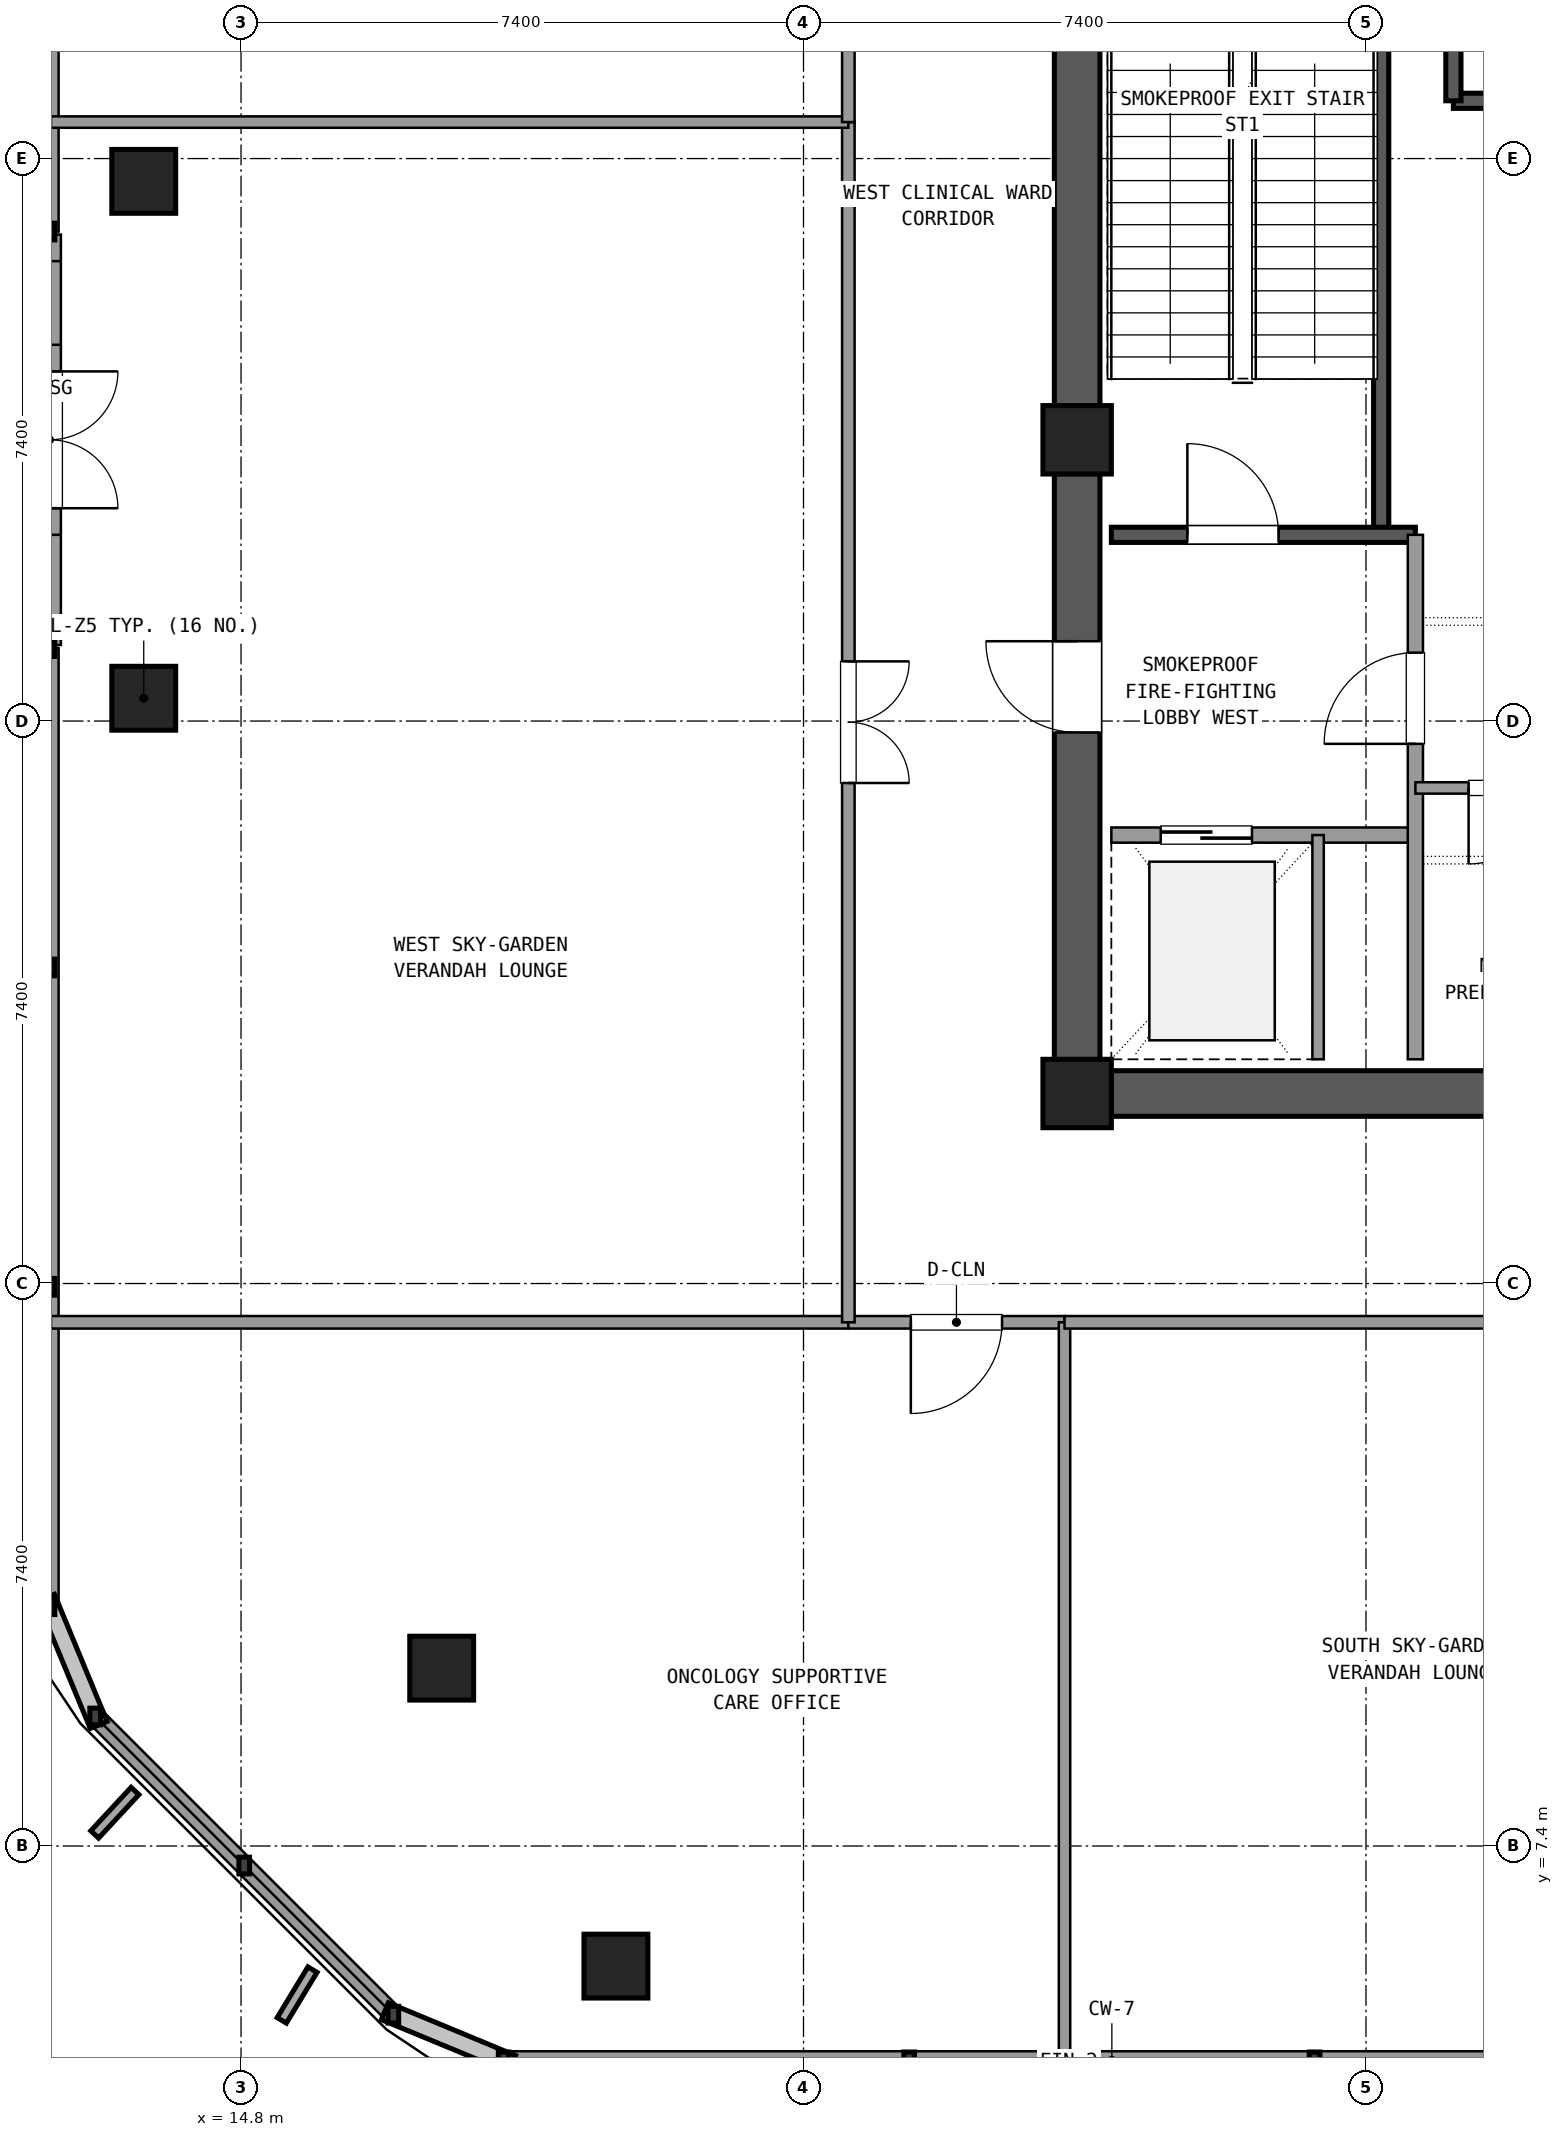
"""IFC4 building model, lengths in metres.
Left out: names, types, materials, properties, quantities, classifications, styles, units other than length and angle.
Written with IfcOpenShell. Run it as: python <this file> out.ifc"""

import sys

from ifc_helpers import new_model, si_unit, direction, frame, frame_2d, origin, origin_2d, place, context, subcontext, project, spatial, rectangle, extrude, element, fill, save


model = new_model("IFC4")
c1 = context("Model", 3, precision=1e-05, world=origin(), true_north=direction((0.0, 1.0)))
c2 = subcontext(c1, "Body", "Model", "MODEL_VIEW")
j1 = project(units=[si_unit("LENGTHUNIT", "METRE"), si_unit("PLANEANGLEUNIT", "RADIAN")], contexts=[c1])
p1 = place(None, origin())
s1 = spatial("IfcSite", under=j1, at=p1, CompositionType="ELEMENT")
p2 = place(p1, origin())
s2 = spatial("IfcBuilding", under=s1, at=p2, CompositionType="ELEMENT")
p3 = place(p2, frame((0.0, 0.0, 237.06)))
s3 = spatial("IfcBuildingStorey", under=s2, at=p3, CompositionType="ELEMENT", Elevation=237.06)
for number, where, z_axis, x_axis in (
    (1, (25.8, 17.3, 0.0), (0.0, 0.0, 1.0), (1.0, 0.0, 0.0)),
    (2, (25.8, 25.9, 0.0), (0.0, 0.0, 1.0), (1.0, 0.0, 0.0)),
):
    element("IfcColumn", number, at=place(p3, frame(where, z_axis=z_axis, x_axis=x_axis)), inside=s3, PredefinedType="COLUMN", context=c2, shape_type="SweptSolid", body=[
        extrude(rectangle(XDim=0.9, YDim=0.9, at=origin_2d()), origin(), (0.0, 0.0, 1.0), 5.76),
    ])
p4 = place(p3, frame((26.245, 17.3, 0.0), z_axis=(0.0, 0.0, 1.0), x_axis=(1.0, 0.0, 0.0)))
e3 = element("IfcWall", 3, at=p4, inside=s3, PredefinedType="SHEAR", context=c2, shape_type="SweptSolid", body=[
    extrude(rectangle(XDim=10.31, YDim=0.6, at=frame_2d((5.155, 0.0))), origin(), (0.0, 0.0, 1.0), 5.48),
])
p5 = place(p3, frame((25.8, 34.055, 0.0), z_axis=(0.0, 0.0, 1.0), x_axis=(0.0, -1.0, 0.0)))
e4 = element("IfcWall", 4, at=p5, inside=s3, PredefinedType="SHEAR", context=c2, shape_type="SweptSolid", body=[
    extrude(rectangle(XDim=7.71, YDim=0.6, at=frame_2d((3.855, 0.0))), origin(), (0.0, 0.0, 1.0), 5.48),
])
p6 = place(p3, frame((25.8, 25.455, 0.0), z_axis=(0.0, 0.0, 1.0), x_axis=(0.0, -1.0, 0.0)))
e5 = element("IfcWall", 5, at=p6, inside=s3, PredefinedType="SHEAR", context=c2, shape_type="SweptSolid", body=[
    extrude(rectangle(XDim=7.71, YDim=0.6, at=frame_2d((3.855, 0.0))), origin(), (0.0, 0.0, 1.0), 5.48),
])
p7 = place(p6, frame((2.205, 0.0, 0.0)))
e6 = element("IfcOpeningElement", 6, at=p7, cuts=e5, PredefinedType="OPENING", context=c2, shape_type="SweptSolid", body=[
    extrude(rectangle(XDim=1.2, YDim=2.15, at=frame_2d((0.6, 1.075))), frame((0.0, 0.31, 0.0), z_axis=(0.0, -1.0, 0.0), x_axis=(1.0, 0.0, 0.0)), (0.0, 0.0, 1.0), 0.62),
])
for number, where, z_axis, x_axis in (
    (7, (13.52, 22.5, 0.0), (0.0, 0.0, 1.0), (1.0, 0.0, 0.0)),
    (8, (17.44, 9.74, 0.0), (0.0, 0.0, 1.0), (1.0, 0.0, 0.0)),
    (9, (19.732, 5.82, 0.0), (0.0, 0.0, 1.0), (1.0, 0.0, 0.0)),
    (10, (13.52, 29.3, 0.0), (0.0, 0.0, 1.0), (1.0, 0.0, 0.0)),
):
    element("IfcColumn", number, at=place(p3, frame(where, z_axis=z_axis, x_axis=x_axis)), inside=s3, PredefinedType="COLUMN", context=c2, shape_type="SweptSolid", body=[
        extrude(rectangle(XDim=0.84, YDim=0.84, at=origin_2d()), origin(), (0.0, 0.0, 1.0), 5.76),
    ])
p8 = place(p3, frame((18.255, 4.58, 0.0), z_axis=(0.0, 0.0, 1.0), x_axis=(1.0, 0.0, 0.0)))
e11 = element("IfcWall", 11, at=p8, inside=s3, PredefinedType="SOLIDWALL", context=c2, shape_type="SweptSolid", body=[
    extrude(rectangle(XDim=16.004, YDim=0.24, at=frame_2d((8.002, 0.0))), origin(), (0.0, 0.0, 1.0), 0.85),
])
p9 = place(p3, frame((12.28, 28.6, 0.0), z_axis=(0.0, 0.0, 1.0), x_axis=(0.0, -1.0, 0.0)))
e12 = element("IfcWall", 12, at=p9, inside=s3, PredefinedType="SOLIDWALL", context=c2, shape_type="SweptSolid", body=[
    extrude(rectangle(XDim=5.4, YDim=0.3, at=frame_2d((2.7, 0.0))), origin(), (0.0, 0.0, 1.0), 4.85),
])
p10 = place(p9, frame((1.8, 0.0, 0.0)))
e13 = element("IfcOpeningElement", 13, at=p10, cuts=e12, PredefinedType="OPENING", context=c2, shape_type="SweptSolid", body=[
    extrude(rectangle(XDim=1.8, YDim=2.25, at=frame_2d((0.9, 1.125))), frame((0.0, 0.16, 0.0), z_axis=(0.0, -1.0, 0.0), x_axis=(1.0, 0.0, 0.0)), (0.0, 0.0, 1.0), 0.32),
])
p11 = place(p9, frame((0.35, 0.0, 0.4)))
e14 = element("IfcOpeningElement", 14, at=p11, cuts=e12, PredefinedType="OPENING", context=c2, shape_type="SweptSolid", body=[
    extrude(rectangle(XDim=1.1, YDim=1.8, at=frame_2d((0.55, 0.9))), frame((0.0, 0.16, 0.0), z_axis=(0.0, -1.0, 0.0), x_axis=(1.0, 0.0, 0.0)), (0.0, 0.0, 1.0), 0.32),
])
p12 = place(p9, frame((3.95, 0.0, 0.4)))
e15 = element("IfcOpeningElement", 15, at=p12, cuts=e12, PredefinedType="OPENING", context=c2, shape_type="SweptSolid", body=[
    extrude(rectangle(XDim=1.1, YDim=1.8, at=frame_2d((0.55, 0.9))), frame((0.0, 0.16, 0.0), z_axis=(0.0, -1.0, 0.0), x_axis=(1.0, 0.0, 0.0)), (0.0, 0.0, 1.0), 0.32),
])
p13 = place(p3, frame((12.28, 41.245, 0.0), z_axis=(0.0, 0.0, 1.0), x_axis=(0.0, -1.0, 0.0)))
e16 = element("IfcWall", 16, at=p13, inside=s3, PredefinedType="SOLIDWALL", context=c2, shape_type="SweptSolid", body=[
    extrude(rectangle(XDim=12.605, YDim=0.24, at=frame_2d((6.303, 0.0))), origin(), (0.0, 0.0, 1.0), 0.85),
])
p14 = place(p3, frame((12.28, 23.16, 0.0), z_axis=(0.0, 0.0, 1.0), x_axis=(0.0, -1.0, 0.0)))
e17 = element("IfcWall", 17, at=p14, inside=s3, PredefinedType="SOLIDWALL", context=c2, shape_type="SweptSolid", body=[
    extrude(rectangle(XDim=12.605, YDim=0.24, at=frame_2d((6.302, 0.0))), origin(), (0.0, 0.0, 1.0), 0.85),
])
p15 = place(p3, frame((12.881, 9.104, 0.0), z_axis=(0.0, 0.0, 1.0), x_axis=(0.707084777957, -0.707128783731, 0.0)))
e18 = element("IfcWall", 18, at=p15, inside=s3, PredefinedType="SOLIDWALL", context=c2, shape_type="SweptSolid", body=[
    extrude(rectangle(XDim=5.548, YDim=0.24, at=frame_2d((2.774, 0.0))), origin(), (0.0, 0.0, 1.0), 0.85),
])
p16 = place(p3, frame((29.8, 24.65, 0.0), z_axis=(0.0, 0.0, 1.0), x_axis=(0.0, 1.0, 0.0)))
e19 = element("IfcWall", 19, at=p16, inside=s3, PredefinedType="SHEAR", context=c2, shape_type="SweptSolid", body=[
    extrude(rectangle(XDim=9.4, YDim=0.2, at=frame_2d((4.7, 0.0))), origin(), (0.0, 0.0, 1.0), 5.48),
])
p17 = place(p3, frame((26.25, 24.65, 0.0), z_axis=(0.0, 0.0, 1.0), x_axis=(1.0, 0.0, 0.0)))
e20 = element("IfcWall", 20, at=p17, inside=s3, PredefinedType="SHEAR", context=c2, shape_type="SweptSolid", body=[
    extrude(rectangle(XDim=4.0, YDim=0.2, at=frame_2d((2.0, 0.0))), origin(), (0.0, 0.0, 1.0), 5.48),
])
p18 = place(p17, frame((1.0, 0.0, 0.0)))
e21 = element("IfcOpeningElement", 21, at=p18, cuts=e20, PredefinedType="OPENING", context=c2, shape_type="SweptSolid", body=[
    extrude(rectangle(XDim=1.2, YDim=2.15, at=frame_2d((0.6, 1.075))), frame((0.0, 0.11, 0.0), z_axis=(0.0, -1.0, 0.0), x_axis=(1.0, 0.0, 0.0)), (0.0, 0.0, 1.0), 0.22),
])
p19 = place(p3, frame((30.75, 30.36, 0.0), z_axis=(0.0, 0.0, 1.0), x_axis=(1.0, 0.0, 0.0)))
e22 = element("IfcWall", 22, at=p19, inside=s3, PredefinedType="SHEAR", context=c2, shape_type="SweptSolid", body=[
    extrude(rectangle(XDim=9.5, YDim=0.2, at=frame_2d((4.75, 0.0))), origin(), (0.0, 0.0, 1.0), 5.48),
])
p20 = place(p3, frame((30.75, 30.36, 0.0), z_axis=(0.0, 0.0, 1.0), x_axis=(0.0, 1.0, 0.0)))
e23 = element("IfcWall", 23, at=p20, inside=s3, PredefinedType="SHEAR", context=c2, shape_type="SweptSolid", body=[
    extrude(rectangle(XDim=3.69, YDim=0.2, at=frame_2d((1.845, 0.0))), origin(), (0.0, 0.0, 1.0), 5.48),
])
p21 = place(p3, frame((26.25, 20.7, 0.0), z_axis=(0.0, 0.0, 1.0), x_axis=(1.0, 0.0, 0.0)))
e24 = element("IfcWall", 24, at=p21, inside=s3, PredefinedType="SOLIDWALL", context=c2, shape_type="SweptSolid", body=[
    extrude(rectangle(XDim=4.0, YDim=0.2, at=frame_2d((2.0, 0.0))), origin(), (0.0, 0.0, 1.0), 4.77),
])
p22 = place(p21, frame((0.65, 0.0, 0.0)))
e25 = element("IfcOpeningElement", 25, at=p22, cuts=e24, PredefinedType="OPENING", context=c2, shape_type="SweptSolid", body=[
    extrude(rectangle(XDim=1.2, YDim=2.15, at=frame_2d((0.6, 1.075))), frame((0.0, 0.11, 0.0), z_axis=(0.0, -1.0, 0.0), x_axis=(1.0, 0.0, 0.0)), (0.0, 0.0, 1.0), 0.22),
])
p23 = place(p3, frame((30.25, 17.75, 0.0), z_axis=(0.0, 0.0, 1.0), x_axis=(0.0, 1.0, 0.0)))
e26 = element("IfcWall", 26, at=p23, inside=s3, PredefinedType="SOLIDWALL", context=c2, shape_type="SweptSolid", body=[
    extrude(rectangle(XDim=6.9, YDim=0.2, at=frame_2d((3.45, 0.0))), origin(), (0.0, 0.0, 1.0), 4.77),
])
p24 = place(p23, frame((4.15, 0.0, 0.0)))
e27 = element("IfcOpeningElement", 27, at=p24, cuts=e26, PredefinedType="OPENING", context=c2, shape_type="SweptSolid", body=[
    extrude(rectangle(XDim=1.2, YDim=2.15, at=frame_2d((0.6, 1.075))), frame((0.0, 0.11, 0.0), z_axis=(0.0, -1.0, 0.0), x_axis=(1.0, 0.0, 0.0)), (0.0, 0.0, 1.0), 0.22),
])
p25 = place(p3, frame((28.97, 17.75, 0.0), z_axis=(0.0, 0.0, 1.0), x_axis=(0.0, 1.0, 0.0)))
e28 = element("IfcWall", 28, at=p25, inside=s3, PredefinedType="PARTITIONING", context=c2, shape_type="SweptSolid", body=[
    extrude(rectangle(XDim=2.95, YDim=0.15, at=frame_2d((1.475, 0.0))), origin(), (0.0, 0.0, 1.0), 4.77),
])
p26 = place(p3, frame((30.25, 21.32, 0.0), z_axis=(0.0, 0.0, 1.0), x_axis=(1.0, 0.0, 0.0)))
e29 = element("IfcWall", 29, at=p26, inside=s3, PredefinedType="PARTITIONING", context=c2, shape_type="SweptSolid", body=[
    extrude(rectangle(XDim=7.0, YDim=0.15, at=frame_2d((3.5, 0.0))), origin(), (0.0, 0.0, 1.0), 4.77),
])
p27 = place(p26, frame((0.7, 0.0, 0.0)))
e30 = element("IfcOpeningElement", 30, at=p27, cuts=e29, PredefinedType="OPENING", context=c2, shape_type="SweptSolid", body=[
    extrude(rectangle(XDim=1.0, YDim=2.15, at=frame_2d((0.5, 1.075))), frame((0.0, 0.085, 0.0), z_axis=(0.0, -1.0, 0.0), x_axis=(1.0, 0.0, 0.0)), (0.0, 0.0, 1.0), 0.17),
])
p28 = place(p26, frame((3.7, 0.0, 0.0)))
e31 = element("IfcOpeningElement", 31, at=p28, cuts=e29, PredefinedType="OPENING", context=c2, shape_type="SweptSolid", body=[
    extrude(rectangle(XDim=1.0, YDim=2.15, at=frame_2d((0.5, 1.075))), frame((0.0, 0.085, 0.0), z_axis=(0.0, -1.0, 0.0), x_axis=(1.0, 0.0, 0.0)), (0.0, 0.0, 1.0), 0.17),
])
p29 = place(p3, frame((12.3, 14.29, 0.0), z_axis=(0.0, 0.0, 1.0), x_axis=(1.0, 0.0, 0.0)))
e32 = element("IfcWall", 32, at=p29, inside=s3, PredefinedType="PARTITIONING", context=c2, shape_type="SweptSolid", body=[
    extrude(rectangle(XDim=10.49, YDim=0.165, at=frame_2d((5.245, 0.0))), origin(), (0.0, 0.0, 1.0), 4.77),
])
p30 = place(p3, frame((22.79, 14.29, 0.0), z_axis=(0.0, 0.0, 1.0), x_axis=(1.0, 0.0, 0.0)))
e33 = element("IfcWall", 33, at=p30, inside=s3, PredefinedType="PARTITIONING", context=c2, shape_type="SweptSolid", body=[
    extrude(rectangle(XDim=2.844, YDim=0.165, at=frame_2d((1.422, 0.0))), origin(), (0.0, 0.0, 1.0), 4.77),
])
p31 = place(p30, frame((0.822, 0.0, 0.0)))
e34 = element("IfcOpeningElement", 34, at=p31, cuts=e33, PredefinedType="OPENING", context=c2, shape_type="SweptSolid", body=[
    extrude(rectangle(XDim=1.2, YDim=2.15, at=frame_2d((0.6, 1.075))), frame((0.0, 0.093, 0.0), z_axis=(0.0, -1.0, 0.0), x_axis=(1.0, 0.0, 0.0)), (0.0, 0.0, 1.0), 0.185),
])
p32 = place(p3, frame((25.634, 14.29, 0.0), z_axis=(0.0, 0.0, 1.0), x_axis=(0.0, -1.0, 0.0)))
e35 = element("IfcWall", 35, at=p32, inside=s3, PredefinedType="PARTITIONING", context=c2, shape_type="SweptSolid", body=[
    extrude(rectangle(XDim=9.69, YDim=0.15, at=frame_2d((4.845, 0.0))), origin(), (0.0, 0.0, 1.0), 4.77),
])
p33 = place(p3, frame((25.634, 14.29, 0.0), z_axis=(0.0, 0.0, 1.0), x_axis=(1.0, 0.0, 0.0)))
e36 = element("IfcWall", 36, at=p33, inside=s3, PredefinedType="PARTITIONING", context=c2, shape_type="SweptSolid", body=[
    extrude(rectangle(XDim=17.996, YDim=0.165, at=frame_2d((8.998, 0.0))), origin(), (0.0, 0.0, 1.0), 4.77),
])
p34 = place(p33, frame((8.198, 0.0, 0.0)))
e37 = element("IfcOpeningElement", 37, at=p34, cuts=e36, PredefinedType="OPENING", context=c2, shape_type="SweptSolid", body=[
    extrude(rectangle(XDim=1.6, YDim=2.2, at=frame_2d((0.8, 1.1))), frame((0.0, 0.093, 0.0), z_axis=(0.0, -1.0, 0.0), x_axis=(1.0, 0.0, 0.0)), (0.0, 0.0, 1.0), 0.185),
])
p35 = place(p3, frame((22.79, 14.29, 0.0), z_axis=(0.0, 0.0, 1.0), x_axis=(0.0, 1.0, 0.0)))
e38 = element("IfcWall", 38, at=p35, inside=s3, PredefinedType="PARTITIONING", context=c2, shape_type="SweptSolid", body=[
    extrude(rectangle(XDim=15.79, YDim=0.165, at=frame_2d((7.895, 0.0))), origin(), (0.0, 0.0, 1.0), 4.77),
])
p36 = place(p35, frame((7.095, 0.0, 0.0)))
e39 = element("IfcOpeningElement", 39, at=p36, cuts=e38, PredefinedType="OPENING", context=c2, shape_type="SweptSolid", body=[
    extrude(rectangle(XDim=1.6, YDim=2.2, at=frame_2d((0.8, 1.1))), frame((0.0, 0.093, 0.0), z_axis=(0.0, -1.0, 0.0), x_axis=(1.0, 0.0, 0.0)), (0.0, 0.0, 1.0), 0.185),
])
p37 = place(p3, frame((22.79, 30.08, 0.0), z_axis=(0.0, 0.0, 1.0), x_axis=(-1.0, 0.0, 0.0)))
e40 = element("IfcWall", 40, at=p37, inside=s3, PredefinedType="PARTITIONING", context=c2, shape_type="SweptSolid", body=[
    extrude(rectangle(XDim=10.49, YDim=0.15, at=frame_2d((5.245, 0.0))), origin(), (0.0, 0.0, 1.0), 4.77),
])
p38 = place(p3, frame((22.79, 30.08, 0.0), z_axis=(0.0, 0.0, 1.0), x_axis=(0.0, 1.0, 0.0)))
e41 = element("IfcWall", 41, at=p38, inside=s3, PredefinedType="PARTITIONING", context=c2, shape_type="SweptSolid", body=[
    extrude(rectangle(XDim=7.43, YDim=0.165, at=frame_2d((3.715, 0.0))), origin(), (0.0, 0.0, 1.0), 4.77),
])
p39 = place(p38, frame((2.915, 0.0, 0.0)))
e42 = element("IfcOpeningElement", 42, at=p39, cuts=e41, PredefinedType="OPENING", context=c2, shape_type="SweptSolid", body=[
    extrude(rectangle(XDim=1.6, YDim=2.2, at=frame_2d((0.8, 1.1))), frame((0.0, 0.093, 0.0), z_axis=(0.0, -1.0, 0.0), x_axis=(1.0, 0.0, 0.0)), (0.0, 0.0, 1.0), 0.185),
])
p40 = place(p18, origin())
e43 = element("IfcDoor", 43, at=p40, inside=s3, OperationType="SINGLE_SWING_LEFT", PredefinedType="DOOR", context=c2, shape_type="SweptSolid", body=[
    extrude(rectangle(XDim=1.2, YDim=2.15, at=frame_2d((0.6, 1.075))), frame((0.0, 0.025, 0.0), z_axis=(0.0, -1.0, 0.0), x_axis=(1.0, 0.0, 0.0)), (0.0, 0.0, 1.0), 0.05),
])
fill(e21, e43)
p41 = place(p22, origin())
e44 = element("IfcDoor", 44, at=p41, inside=s3, OperationType="SLIDING_TO_LEFT", PredefinedType="DOOR", context=c2, shape_type="SweptSolid", body=[
    extrude(rectangle(XDim=1.2, YDim=2.15, at=frame_2d((0.6, 1.075))), frame((0.0, 0.025, 0.0), z_axis=(0.0, -1.0, 0.0), x_axis=(1.0, 0.0, 0.0)), (0.0, 0.0, 1.0), 0.05),
])
fill(e25, e44)
p42 = place(p24, origin())
e45 = element("IfcDoor", 45, at=p42, inside=s3, OperationType="SINGLE_SWING_LEFT", PredefinedType="DOOR", context=c2, shape_type="SweptSolid", body=[
    extrude(rectangle(XDim=1.2, YDim=2.15, at=frame_2d((0.6, 1.075))), frame((0.0, 0.025, 0.0), z_axis=(0.0, -1.0, 0.0), x_axis=(1.0, 0.0, 0.0)), (0.0, 0.0, 1.0), 0.05),
])
fill(e27, e45)
p43 = place(p7, frame((1.2, 0.0, 0.0), z_axis=(0.0, 0.0, 1.0), x_axis=(-1.0, 0.0, 0.0)))
e46 = element("IfcDoor", 46, at=p43, inside=s3, OperationType="SINGLE_SWING_LEFT", PredefinedType="DOOR", context=c2, shape_type="SweptSolid", body=[
    extrude(rectangle(XDim=1.2, YDim=2.15, at=frame_2d((0.6, 1.075))), frame((0.0, 0.025, 0.0), z_axis=(0.0, -1.0, 0.0), x_axis=(1.0, 0.0, 0.0)), (0.0, 0.0, 1.0), 0.05),
])
fill(e6, e46)
p44 = place(p27, frame((1.0, 0.0, 0.0), z_axis=(0.0, 0.0, 1.0), x_axis=(-1.0, 0.0, 0.0)))
e47 = element("IfcDoor", 47, at=p44, inside=s3, OperationType="SINGLE_SWING_LEFT", PredefinedType="DOOR", context=c2, shape_type="SweptSolid", body=[
    extrude(rectangle(XDim=1.0, YDim=2.15, at=frame_2d((0.5, 1.075))), frame((0.0, 0.025, 0.0), z_axis=(0.0, -1.0, 0.0), x_axis=(1.0, 0.0, 0.0)), (0.0, 0.0, 1.0), 0.05),
])
fill(e30, e47)
p45 = place(p31, frame((1.2, 0.0, 0.0), z_axis=(0.0, 0.0, 1.0), x_axis=(-1.0, 0.0, 0.0)))
e48 = element("IfcDoor", 48, at=p45, inside=s3, OperationType="SINGLE_SWING_LEFT", PredefinedType="DOOR", context=c2, shape_type="SweptSolid", body=[
    extrude(rectangle(XDim=1.2, YDim=2.15, at=frame_2d((0.6, 1.075))), frame((0.0, 0.025, 0.0), z_axis=(0.0, -1.0, 0.0), x_axis=(1.0, 0.0, 0.0)), (0.0, 0.0, 1.0), 0.05),
])
fill(e34, e48)
p46 = place(p36, frame((1.6, 0.0, 0.0), z_axis=(0.0, 0.0, 1.0), x_axis=(-1.0, 0.0, 0.0)))
e49 = element("IfcDoor", 49, at=p46, inside=s3, OperationType="DOUBLE_DOOR_SINGLE_SWING", PredefinedType="DOOR", context=c2, shape_type="SweptSolid", body=[
    extrude(rectangle(XDim=1.6, YDim=2.2, at=frame_2d((0.8, 1.1))), frame((0.0, 0.025, 0.0), z_axis=(0.0, -1.0, 0.0), x_axis=(1.0, 0.0, 0.0)), (0.0, 0.0, 1.0), 0.05),
])
fill(e39, e49)
save(model, sys.argv[1])
